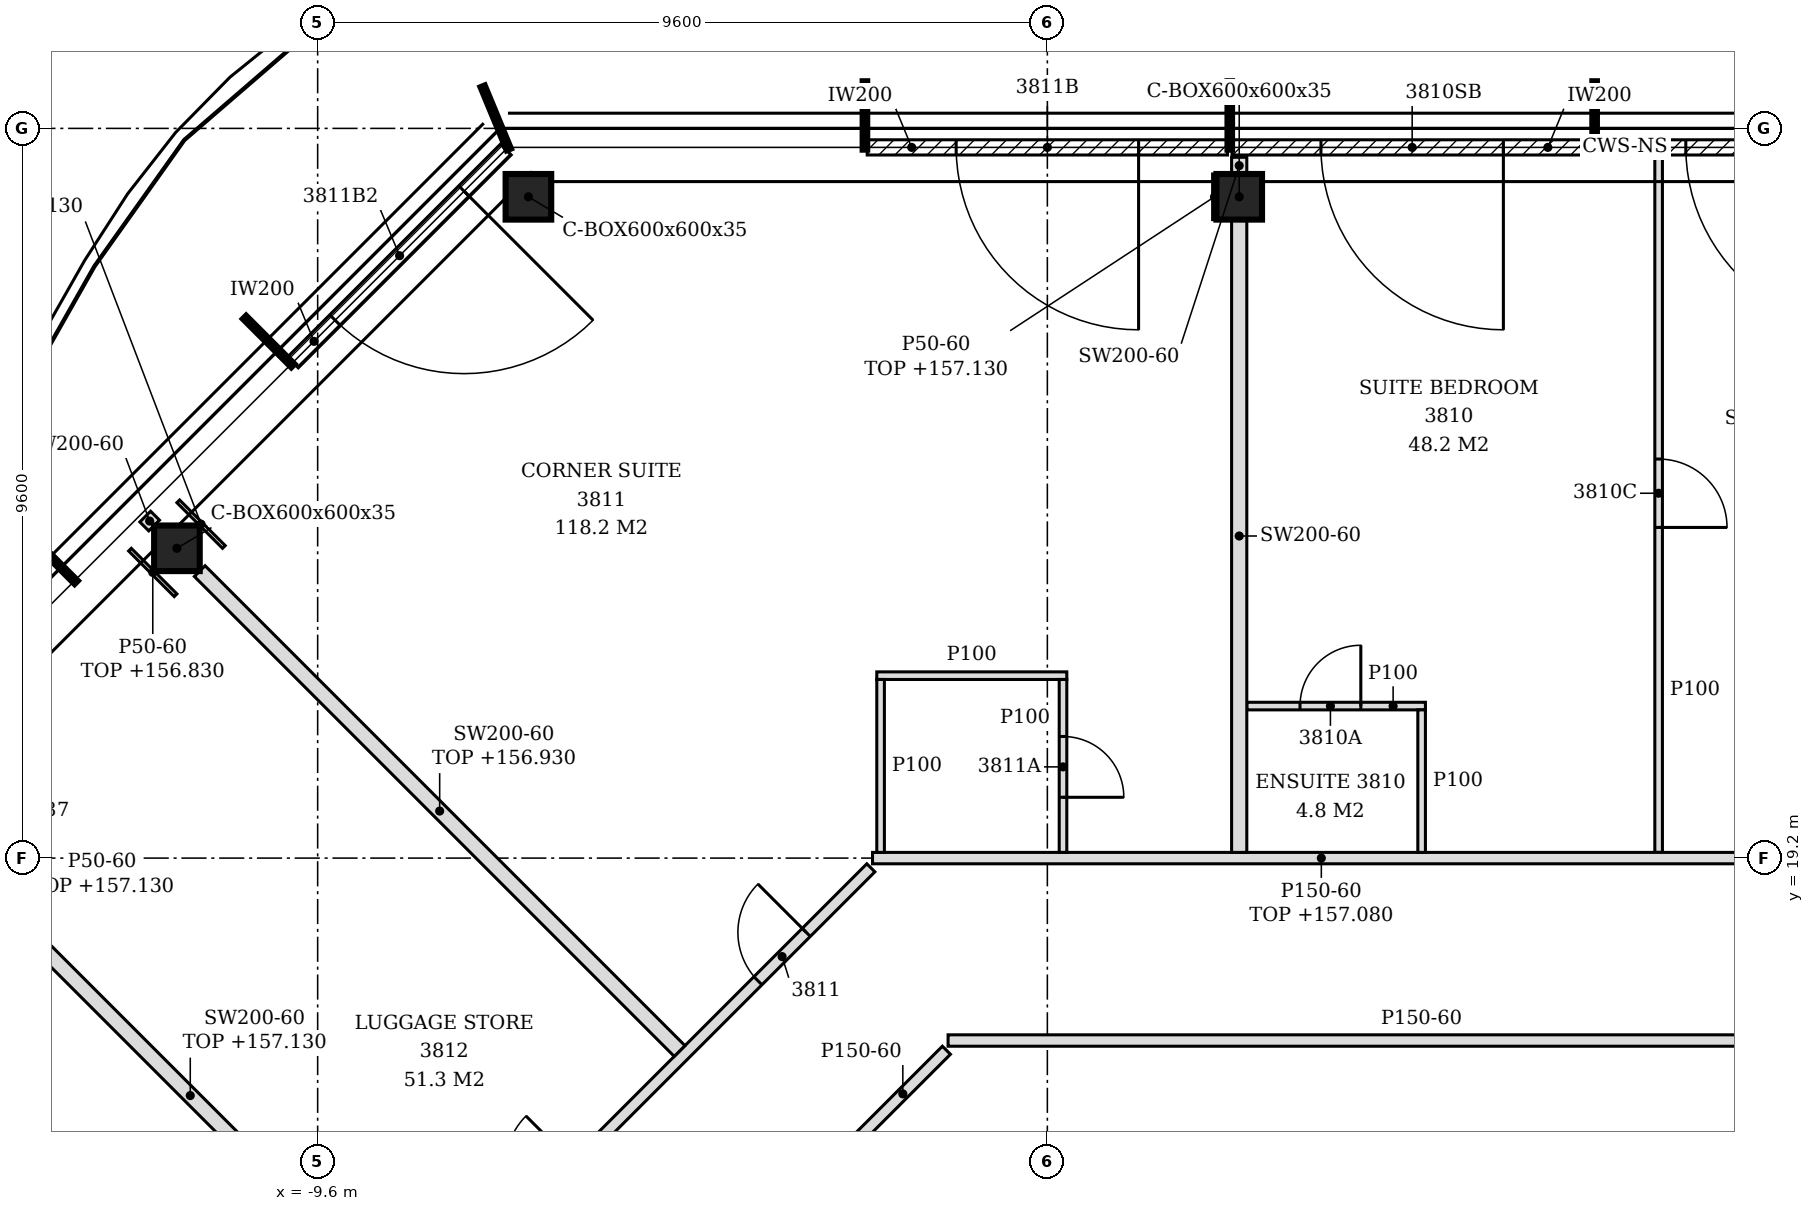
"""IFC4 building model, lengths in metres.
Left out: names, types, materials, properties, quantities, classifications, styles, units other than length and angle.
Written with IfcOpenShell. Run it as: python <this file> out.ifc"""

import sys

from ifc_helpers import new_model, si_unit, direction, frame, frame_2d, origin, origin_2d, place, context, subcontext, project, spatial, polyline, rectangle, hollow_rectangle, outline, extrude, element, fill, save


model = new_model("IFC4")
c1 = context("Model", 3, precision=1e-05, world=origin(), true_north=direction((0.0, 1.0)))
c2 = subcontext(c1, "Body", "Model", "MODEL_VIEW")
j1 = project(units=[si_unit("LENGTHUNIT", "METRE"), si_unit("PLANEANGLEUNIT", "RADIAN")], contexts=[c1])
p1 = place(None, origin())
s1 = spatial("IfcSite", under=j1, at=p1, CompositionType="ELEMENT")
p2 = place(p1, origin())
s2 = spatial("IfcBuilding", under=s1, at=p2, CompositionType="ELEMENT")
p3 = place(p2, frame((0.0, 0.0, 154.2)))
s3 = spatial("IfcBuildingStorey", under=s2, at=p3, CompositionType="ELEMENT", Elevation=154.2)
for number, where, z_axis, x_axis in (
    (1, (2.524, 27.9, -0.15), (0.0, 0.0, 1.0), (1.0, 0.0, 0.0)),
    (2, (-6.827, 27.9, -0.15), (0.0, 0.0, 1.0), (1.0, 0.0, 0.0)),
    (3, (-11.451, 23.276, -0.15), (0.0, 0.0, 1.0), (1.0, 0.0, 0.0)),
):
    element("IfcColumn", number, at=place(p3, frame(where, z_axis=z_axis, x_axis=x_axis)), inside=s3, PredefinedType="COLUMN", context=c2, shape_type="SweptSolid", body=[
        extrude(hollow_rectangle(XDim=0.6, YDim=0.6, WallThickness=0.035, at=origin_2d()), origin(), (0.0, 0.0, 1.0), 3.6),
    ])
p4 = place(p3, frame((11.97, 28.55, 0.0), z_axis=(0.0, 0.0, 1.0), x_axis=(-1.0, 0.0, 0.0)))
e4 = element("IfcWall", 4, at=p4, inside=s3, PredefinedType="NOTDEFINED", context=c2, shape_type="SweptSolid", body=[
    extrude(rectangle(XDim=4.74, YDim=0.2, at=frame_2d((2.37, 0.0))), origin(), (0.0, 0.0, 1.0), 3.45),
])
p5 = place(p4, frame((1.17, 0.0, 0.0)))
e5 = element("IfcOpeningElement", 5, at=p5, cuts=e4, PredefinedType="OPENING", context=c2, shape_type="SweptSolid", body=[
    extrude(rectangle(XDim=2.4, YDim=2.4, at=frame_2d((1.2, 1.2))), frame((0.0, 0.11, 0.0), z_axis=(0.0, -1.0, 0.0), x_axis=(1.0, 0.0, 0.0)), (0.0, 0.0, 1.0), 0.22),
])
p6 = place(p3, frame((7.17, 28.55, 0.0), z_axis=(0.0, 0.0, 1.0), x_axis=(-1.0, 0.0, 0.0)))
e6 = element("IfcWall", 6, at=p6, inside=s3, PredefinedType="NOTDEFINED", context=c2, shape_type="SweptSolid", body=[
    extrude(rectangle(XDim=4.74, YDim=0.2, at=frame_2d((2.37, 0.0))), origin(), (0.0, 0.0, 1.0), 3.45),
])
p7 = place(p6, frame((1.17, 0.0, 0.0)))
e7 = element("IfcOpeningElement", 7, at=p7, cuts=e6, PredefinedType="OPENING", context=c2, shape_type="SweptSolid", body=[
    extrude(rectangle(XDim=2.4, YDim=2.4, at=frame_2d((1.2, 1.2))), frame((0.0, 0.11, 0.0), z_axis=(0.0, -1.0, 0.0), x_axis=(1.0, 0.0, 0.0)), (0.0, 0.0, 1.0), 0.22),
])
p8 = place(p3, frame((2.37, 28.55, 0.0), z_axis=(0.0, 0.0, 1.0), x_axis=(-1.0, 0.0, 0.0)))
e8 = element("IfcWall", 8, at=p8, inside=s3, PredefinedType="NOTDEFINED", context=c2, shape_type="SweptSolid", body=[
    extrude(rectangle(XDim=4.74, YDim=0.2, at=frame_2d((2.37, 0.0))), origin(), (0.0, 0.0, 1.0), 3.45),
])
p9 = place(p8, frame((1.17, 0.0, 0.0)))
e9 = element("IfcOpeningElement", 9, at=p9, cuts=e8, PredefinedType="OPENING", context=c2, shape_type="SweptSolid", body=[
    extrude(rectangle(XDim=2.4, YDim=2.4, at=frame_2d((1.2, 1.2))), frame((0.0, 0.11, 0.0), z_axis=(0.0, -1.0, 0.0), x_axis=(1.0, 0.0, 0.0)), (0.0, 0.0, 1.0), 0.22),
])
p10 = place(p3, frame((-7.125, 28.522, 0.0), z_axis=(0.0, 0.0, 1.0), x_axis=(-0.707106781187, -0.707106781187, 0.0)))
e10 = element("IfcWall", 10, at=p10, inside=s3, PredefinedType="NOTDEFINED", context=c2, shape_type="SweptSolid", body=[
    extrude(rectangle(XDim=3.962, YDim=0.2, at=frame_2d((1.981, 0.0))), origin(), (0.0, 0.0, 1.0), 3.45),
])
p11 = place(p10, frame((0.775, 0.0, 0.0)))
e11 = element("IfcOpeningElement", 11, at=p11, cuts=e10, PredefinedType="OPENING", context=c2, shape_type="SweptSolid", body=[
    extrude(rectangle(XDim=2.4, YDim=2.4, at=frame_2d((1.2, 1.2))), frame((0.0, 0.11, 0.0), z_axis=(0.0, -1.0, 0.0), x_axis=(1.0, 0.0, 0.0)), (0.0, 0.0, 1.0), 0.22),
])
p12 = place(p3, frame((-12.075, 9.319, 0.0), z_axis=(0.0, 0.0, 1.0), x_axis=(0.707106781187, 0.707106781187, 0.0)))
e12 = element("IfcWall", 12, at=p12, inside=s3, PredefinedType="PARTITIONING", context=c2, shape_type="SweptSolid", body=[
    extrude(rectangle(XDim=13.793, YDim=0.15, at=frame_2d((6.896, 0.0))), origin(), (0.0, 0.0, 1.0), 2.73),
])
p13 = place(p12, frame((11.692, 0.0, 0.0)))
e13 = element("IfcOpeningElement", 13, at=p13, cuts=e12, PredefinedType="OPENING", context=c2, shape_type="SweptSolid", body=[
    extrude(rectangle(XDim=0.9, YDim=2.1, at=frame_2d((0.45, 1.05))), frame((0.0, 0.085, 0.0), z_axis=(0.0, -1.0, 0.0), x_axis=(1.0, 0.0, 0.0)), (0.0, 0.0, 1.0), 0.17),
])
p14 = place(p12, frame((7.376, 0.0, 0.0)))
e14 = element("IfcOpeningElement", 14, at=p14, cuts=e12, PredefinedType="OPENING", context=c2, shape_type="SweptSolid", body=[
    extrude(rectangle(XDim=0.9, YDim=2.1, at=frame_2d((0.45, 1.05))), frame((0.0, 0.085, 0.0), z_axis=(0.0, -1.0, 0.0), x_axis=(1.0, 0.0, 0.0)), (0.0, 0.0, 1.0), 0.17),
])
p15 = place(p12, frame((3.62, 0.0, 0.0)))
e15 = element("IfcOpeningElement", 15, at=p15, cuts=e12, PredefinedType="OPENING", context=c2, shape_type="SweptSolid", body=[
    extrude(rectangle(XDim=0.9, YDim=2.1, at=frame_2d((0.45, 1.05))), frame((0.0, 0.085, 0.0), z_axis=(0.0, -1.0, 0.0), x_axis=(1.0, 0.0, 0.0)), (0.0, 0.0, 1.0), 0.17),
])
p16 = place(p3, frame((-8.35, 13.15, 0.0), z_axis=(0.0, 0.0, 1.0), x_axis=(-0.707092030896, 0.707121531169, 0.0)))
e16 = element("IfcWall", 16, at=p16, inside=s3, PredefinedType="PARTITIONING", context=c2, shape_type="SweptSolid", body=[
    extrude(rectangle(XDim=8.276, YDim=0.2, at=frame_2d((4.138, 0.0))), origin(), (0.0, 0.0, 1.0), 2.93),
])
p17 = place(p3, frame((-2.475, 15.525, 0.0), z_axis=(0.0, 0.0, 1.0), x_axis=(0.707106781187, 0.707106781187, 0.0)))
e17 = element("IfcWall", 17, at=p17, inside=s3, PredefinedType="PARTITIONING", context=c2, shape_type="SweptSolid", body=[
    extrude(rectangle(XDim=1.622, YDim=0.15, at=frame_2d((0.811, 0.0))), origin(), (0.0, 0.0, 1.0), 3.45),
])
p18 = place(p3, frame((-4.838, 16.662, 0.0), z_axis=(0.0, 0.0, 1.0), x_axis=(-0.707120452615, 0.707093109494, 0.0)))
e18 = element("IfcWall", 18, at=p18, inside=s3, PredefinedType="PARTITIONING", context=c2, shape_type="SweptSolid", body=[
    extrude(rectangle(XDim=8.929, YDim=0.2, at=frame_2d((4.464, 0.0))), origin(), (0.0, 0.0, 1.0), 2.73),
])
p19 = place(p3, frame((-1.306, 16.8, 0.0), z_axis=(0.0, 0.0, 1.0), x_axis=(1.0, 0.0, 0.0)))
e19 = element("IfcWall", 19, at=p19, inside=s3, PredefinedType="PARTITIONING", context=c2, shape_type="SweptSolid", body=[
    extrude(outline(polyline([(0.0, 0.0), (16.806, 0.0), (16.806, 3.45), (8.656, 3.45), (8.654, 2.73), (8.356, 2.73), (8.354, 3.45), (0.0, 3.45), (0.0, 0.0)])), frame((0.0, 0.075, 0.0), z_axis=(0.0, -1.0, 0.0), x_axis=(1.0, 0.0, 0.0)), (0.0, 0.0, 1.0), 0.15),
])
p20 = place(p19, frame((15.006, 0.0, 0.0)))
e20 = element("IfcOpeningElement", 20, at=p20, cuts=e19, PredefinedType="OPENING", context=c2, shape_type="SweptSolid", body=[
    extrude(rectangle(XDim=0.8, YDim=2.1, at=frame_2d((0.4, 1.05))), frame((0.0, 0.085, 0.0), z_axis=(0.0, -1.0, 0.0), x_axis=(1.0, 0.0, 0.0)), (0.0, 0.0, 1.0), 0.17),
])
p21 = place(p19, frame((12.456, 0.0, 0.0)))
e21 = element("IfcOpeningElement", 21, at=p21, cuts=e19, PredefinedType="OPENING", context=c2, shape_type="SweptSolid", body=[
    extrude(rectangle(XDim=0.8, YDim=2.1, at=frame_2d((0.4, 1.05))), frame((0.0, 0.085, 0.0), z_axis=(0.0, -1.0, 0.0), x_axis=(1.0, 0.0, 0.0)), (0.0, 0.0, 1.0), 0.17),
])
p22 = place(p3, frame((-2.3, 19.2, 0.0), z_axis=(0.0, 0.0, 1.0), x_axis=(1.0, 0.0, 0.0)))
e22 = element("IfcWall", 22, at=p22, inside=s3, PredefinedType="PARTITIONING", context=c2, shape_type="SweptSolid", body=[
    extrude(outline(polyline([(0.0, 0.0), (19.0, 0.0), (19.0, 2.88), (9.65, 2.88), (9.648, 2.73), (9.35, 2.73), (9.348, 2.88), (0.0, 2.88), (0.0, 0.0)])), frame((0.0, 0.075, 0.0), z_axis=(0.0, -1.0, 0.0), x_axis=(1.0, 0.0, 0.0)), (0.0, 0.0, 1.0), 0.15),
])
p23 = place(p22, frame((11.809, 0.0, 0.0)))
e23 = element("IfcOpeningElement", 23, at=p23, cuts=e22, PredefinedType="OPENING", context=c2, shape_type="SweptSolid", body=[
    extrude(rectangle(XDim=0.9, YDim=2.1, at=frame_2d((0.45, 1.05))), frame((0.0, 0.085, 0.0), z_axis=(0.0, -1.0, 0.0), x_axis=(1.0, 0.0, 0.0)), (0.0, 0.0, 1.0), 0.17),
])
p24 = place(p3, frame((-2.194, 19.275, 0.0), z_axis=(0.0, 0.0, 1.0), x_axis=(0.0, 1.0, 0.0)))
e24 = element("IfcWall", 24, at=p24, inside=s3, PredefinedType="PARTITIONING", context=c2, shape_type="SweptSolid", body=[
    extrude(outline(polyline([(0.0, 0.0), (2.275, 0.0), (2.275, 3.45), (0.03, 3.45), (0.028, 2.88), (0.0, 2.88), (0.0, 0.0)])), frame((0.0, 0.05, 0.0), z_axis=(0.0, -1.0, 0.0), x_axis=(1.0, 0.0, 0.0)), (0.0, 0.0, 1.0), 0.1),
])
p25 = place(p3, frame((0.206, 19.275, 0.0), z_axis=(0.0, 0.0, 1.0), x_axis=(0.0, 1.0, 0.0)))
e25 = element("IfcWall", 25, at=p25, inside=s3, PredefinedType="PARTITIONING", context=c2, shape_type="SweptSolid", body=[
    extrude(outline(polyline([(0.0, 0.0), (2.275, 0.0), (2.275, 3.45), (0.03, 3.45), (0.028, 2.88), (0.0, 2.88), (0.0, 0.0)])), frame((0.0, 0.05, 0.0), z_axis=(0.0, -1.0, 0.0), x_axis=(1.0, 0.0, 0.0)), (0.0, 0.0, 1.0), 0.1),
])
p26 = place(p25, frame((0.725, 0.0, 0.0)))
e26 = element("IfcOpeningElement", 26, at=p26, cuts=e25, PredefinedType="OPENING", context=c2, shape_type="SweptSolid", body=[
    extrude(rectangle(XDim=0.8, YDim=2.1, at=frame_2d((0.4, 1.05))), frame((0.0, 0.06, 0.0), z_axis=(0.0, -1.0, 0.0), x_axis=(1.0, 0.0, 0.0)), (0.0, 0.0, 1.0), 0.12),
])
p27 = place(p3, frame((2.524, 19.275, 0.0), z_axis=(0.0, 0.0, 1.0), x_axis=(0.0, 1.0, 0.0)))
e27 = element("IfcWall", 27, at=p27, inside=s3, PredefinedType="PARTITIONING", context=c2, shape_type="SweptSolid", body=[
    extrude(outline(polyline([(0.0, 0.0), (8.325, 0.0), (8.325, 3.45), (4.83, 3.45), (4.828, 2.88), (4.62, 2.88), (4.618, 3.45), (0.03, 3.45), (0.028, 2.88), (0.0, 2.88), (0.0, 0.0)])), frame((0.0, 0.1, 0.0), z_axis=(0.0, -1.0, 0.0), x_axis=(1.0, 0.0, 0.0)), (0.0, 0.0, 1.0), 0.2),
])
p28 = place(p3, frame((4.924, 19.275, 0.0), z_axis=(0.0, 0.0, 1.0), x_axis=(0.0, 1.0, 0.0)))
e28 = element("IfcWall", 28, at=p28, inside=s3, PredefinedType="PARTITIONING", context=c2, shape_type="SweptSolid", body=[
    extrude(outline(polyline([(0.0, 0.0), (1.875, 0.0), (1.875, 3.45), (0.03, 3.45), (0.028, 2.88), (0.0, 2.88), (0.0, 0.0)])), frame((0.0, 0.05, 0.0), z_axis=(0.0, -1.0, 0.0), x_axis=(1.0, 0.0, 0.0)), (0.0, 0.0, 1.0), 0.1),
])
p29 = place(p3, frame((8.042, 19.275, 0.0), z_axis=(0.0, 0.0, 1.0), x_axis=(0.0, 1.0, 0.0)))
e29 = element("IfcWall", 29, at=p29, inside=s3, PredefinedType="PARTITIONING", context=c2, shape_type="SweptSolid", body=[
    extrude(outline(polyline([(0.0, 0.0), (9.145, 0.0), (9.145, 3.45), (8.775, 3.45), (8.773, 2.93), (8.475, 2.93), (8.473, 3.45), (4.83, 3.45), (4.828, 2.88), (4.62, 2.88), (4.618, 3.45), (0.03, 3.45), (0.028, 2.88), (0.0, 2.88), (0.0, 0.0)])), frame((0.0, 0.05, 0.0), z_axis=(0.0, -1.0, 0.0), x_axis=(1.0, 0.0, 0.0)), (0.0, 0.0, 1.0), 0.1),
])
p30 = place(p29, frame((4.275, 0.0, 0.0)))
e30 = element("IfcOpeningElement", 30, at=p30, cuts=e29, PredefinedType="OPENING", context=c2, shape_type="SweptSolid", body=[
    extrude(rectangle(XDim=0.9, YDim=2.1, at=frame_2d((0.45, 1.05))), frame((0.0, 0.06, 0.0), z_axis=(0.0, -1.0, 0.0), x_axis=(1.0, 0.0, 0.0)), (0.0, 0.0, 1.0), 0.12),
])
p31 = place(p3, frame((2.624, 21.2, 0.0), z_axis=(0.0, 0.0, 1.0), x_axis=(1.0, 0.0, 0.0)))
e31 = element("IfcWall", 31, at=p31, inside=s3, PredefinedType="PARTITIONING", context=c2, shape_type="SweptSolid", body=[
    extrude(rectangle(XDim=2.35, YDim=0.1, at=frame_2d((1.175, 0.0))), origin(), (0.0, 0.0, 1.0), 3.45),
])
p32 = place(p31, frame((0.7, 0.0, 0.0)))
e32 = element("IfcOpeningElement", 32, at=p32, cuts=e31, PredefinedType="OPENING", context=c2, shape_type="SweptSolid", body=[
    extrude(rectangle(XDim=0.8, YDim=2.1, at=frame_2d((0.4, 1.05))), frame((0.0, 0.06, 0.0), z_axis=(0.0, -1.0, 0.0), x_axis=(1.0, 0.0, 0.0)), (0.0, 0.0, 1.0), 0.12),
])
p33 = place(p3, frame((-2.244, 21.6, 0.0), z_axis=(0.0, 0.0, 1.0), x_axis=(1.0, 0.0, 0.0)))
e33 = element("IfcWall", 33, at=p33, inside=s3, PredefinedType="PARTITIONING", context=c2, shape_type="SweptSolid", body=[
    extrude(rectangle(XDim=2.5, YDim=0.1, at=frame_2d((1.25, 0.0))), origin(), (0.0, 0.0, 1.0), 3.45),
])
p34 = place(p3, frame((-11.752, 23.576, 0.0), z_axis=(0.0, 0.0, 1.0), x_axis=(-0.707106781187, 0.707106781187, 0.0)))
e34 = element("IfcWall", 34, at=p34, inside=s3, PredefinedType="PARTITIONING", context=c2, shape_type="SweptSolid", body=[
    extrude(rectangle(XDim=0.166, YDim=0.2, at=frame_2d((0.083, 0.0))), origin(), (0.0, 0.0, 1.0), 3.45),
])
p35 = place(p3, frame((2.524, 28.2, 0.0), z_axis=(0.0, 0.0, 1.0), x_axis=(0.0, 1.0, 0.0)))
e35 = element("IfcWall", 35, at=p35, inside=s3, PredefinedType="PARTITIONING", context=c2, shape_type="SweptSolid", body=[
    extrude(rectangle(XDim=0.22, YDim=0.2, at=frame_2d((0.11, 0.0))), origin(), (0.0, 0.0, 1.0), 3.45),
])
p36 = place(p3, frame((-11.469, 22.658, 0.0), z_axis=(0.0, 0.0, 1.0), x_axis=(-0.706962899457, 0.707250633645, 0.0)))
e36 = element("IfcWall", 36, at=p36, inside=s3, PredefinedType="PARTITIONING", context=c2, shape_type="SweptSolid", body=[
    extrude(rectangle(XDim=0.848, YDim=0.05, at=frame_2d((0.424, 0.0))), origin(), (0.0, 0.0, 1.0), 2.63),
])
p37 = place(p3, frame((-10.834, 23.293, 0.0), z_axis=(0.0, 0.0, 1.0), x_axis=(-0.707250633645, 0.706962899457, 0.0)))
e37 = element("IfcWall", 37, at=p37, inside=s3, PredefinedType="PARTITIONING", context=c2, shape_type="SweptSolid", body=[
    extrude(rectangle(XDim=0.848, YDim=0.05, at=frame_2d((0.424, 0.0))), origin(), (0.0, 0.0, 1.0), 2.93),
])
p38 = place(p3, frame((2.199, 27.6, 0.0), z_axis=(0.0, 0.0, 1.0), x_axis=(0.0, 1.0, 0.0)))
e38 = element("IfcWall", 38, at=p38, inside=s3, PredefinedType="PARTITIONING", context=c2, shape_type="SweptSolid", body=[
    extrude(rectangle(XDim=0.6, YDim=0.05, at=frame_2d((0.3, 0.0))), origin(), (0.0, 0.0, 1.0), 2.93),
])
p39 = place(p5, origin())
e39 = element("IfcDoor", 39, at=p39, inside=s3, OperationType="SINGLE_SWING_LEFT", PredefinedType="DOOR", context=c2, shape_type="SweptSolid", body=[
    extrude(rectangle(XDim=2.4, YDim=2.4, at=frame_2d((1.2, 1.2))), frame((0.0, 0.025, 0.0), z_axis=(0.0, -1.0, 0.0), x_axis=(1.0, 0.0, 0.0)), (0.0, 0.0, 1.0), 0.05),
])
fill(e5, e39)
p40 = place(p7, origin())
e40 = element("IfcDoor", 40, at=p40, inside=s3, OperationType="SINGLE_SWING_LEFT", PredefinedType="DOOR", context=c2, shape_type="SweptSolid", body=[
    extrude(rectangle(XDim=2.4, YDim=2.4, at=frame_2d((1.2, 1.2))), frame((0.0, 0.025, 0.0), z_axis=(0.0, -1.0, 0.0), x_axis=(1.0, 0.0, 0.0)), (0.0, 0.0, 1.0), 0.05),
])
fill(e7, e40)
p41 = place(p9, origin())
e41 = element("IfcDoor", 41, at=p41, inside=s3, OperationType="SINGLE_SWING_LEFT", PredefinedType="DOOR", context=c2, shape_type="SweptSolid", body=[
    extrude(rectangle(XDim=2.4, YDim=2.4, at=frame_2d((1.2, 1.2))), frame((0.0, 0.025, 0.0), z_axis=(0.0, -1.0, 0.0), x_axis=(1.0, 0.0, 0.0)), (0.0, 0.0, 1.0), 0.05),
])
fill(e9, e41)
p42 = place(p11, origin())
e42 = element("IfcDoor", 42, at=p42, inside=s3, OperationType="SINGLE_SWING_LEFT", PredefinedType="DOOR", context=c2, shape_type="SweptSolid", body=[
    extrude(rectangle(XDim=2.4, YDim=2.4, at=frame_2d((1.2, 1.2))), frame((0.0, 0.025, 0.0), z_axis=(0.0, -1.0, 0.0), x_axis=(1.0, 0.0, 0.0)), (0.0, 0.0, 1.0), 0.05),
])
fill(e11, e42)
p43 = place(p30, frame((0.9, 0.0, 0.0), z_axis=(0.0, 0.0, 1.0), x_axis=(-1.0, 0.0, 0.0)))
e43 = element("IfcDoor", 43, at=p43, inside=s3, OperationType="SINGLE_SWING_RIGHT", PredefinedType="DOOR", context=c2, shape_type="SweptSolid", body=[
    extrude(rectangle(XDim=0.9, YDim=2.1, at=frame_2d((0.45, 1.05))), frame((0.0, 0.025, 0.0), z_axis=(0.0, -1.0, 0.0), x_axis=(1.0, 0.0, 0.0)), (0.0, 0.0, 1.0), 0.05),
])
fill(e30, e43)
p44 = place(p32, origin())
e44 = element("IfcDoor", 44, at=p44, inside=s3, OperationType="SINGLE_SWING_RIGHT", PredefinedType="DOOR", context=c2, shape_type="SweptSolid", body=[
    extrude(rectangle(XDim=0.8, YDim=2.1, at=frame_2d((0.4, 1.05))), frame((0.0, 0.025, 0.0), z_axis=(0.0, -1.0, 0.0), x_axis=(1.0, 0.0, 0.0)), (0.0, 0.0, 1.0), 0.05),
])
fill(e32, e44)
p45 = place(p13, origin())
e45 = element("IfcDoor", 45, at=p45, inside=s3, OperationType="SINGLE_SWING_RIGHT", PredefinedType="DOOR", context=c2, shape_type="SweptSolid", body=[
    extrude(rectangle(XDim=0.9, YDim=2.1, at=frame_2d((0.45, 1.05))), frame((0.0, 0.025, 0.0), z_axis=(0.0, -1.0, 0.0), x_axis=(1.0, 0.0, 0.0)), (0.0, 0.0, 1.0), 0.05),
])
fill(e13, e45)
p46 = place(p26, frame((0.8, 0.0, 0.0), z_axis=(0.0, 0.0, 1.0), x_axis=(-1.0, 0.0, 0.0)))
e46 = element("IfcDoor", 46, at=p46, inside=s3, OperationType="SINGLE_SWING_RIGHT", PredefinedType="DOOR", context=c2, shape_type="SweptSolid", body=[
    extrude(rectangle(XDim=0.8, YDim=2.1, at=frame_2d((0.4, 1.05))), frame((0.0, 0.025, 0.0), z_axis=(0.0, -1.0, 0.0), x_axis=(1.0, 0.0, 0.0)), (0.0, 0.0, 1.0), 0.05),
])
fill(e26, e46)
save(model, sys.argv[1])
